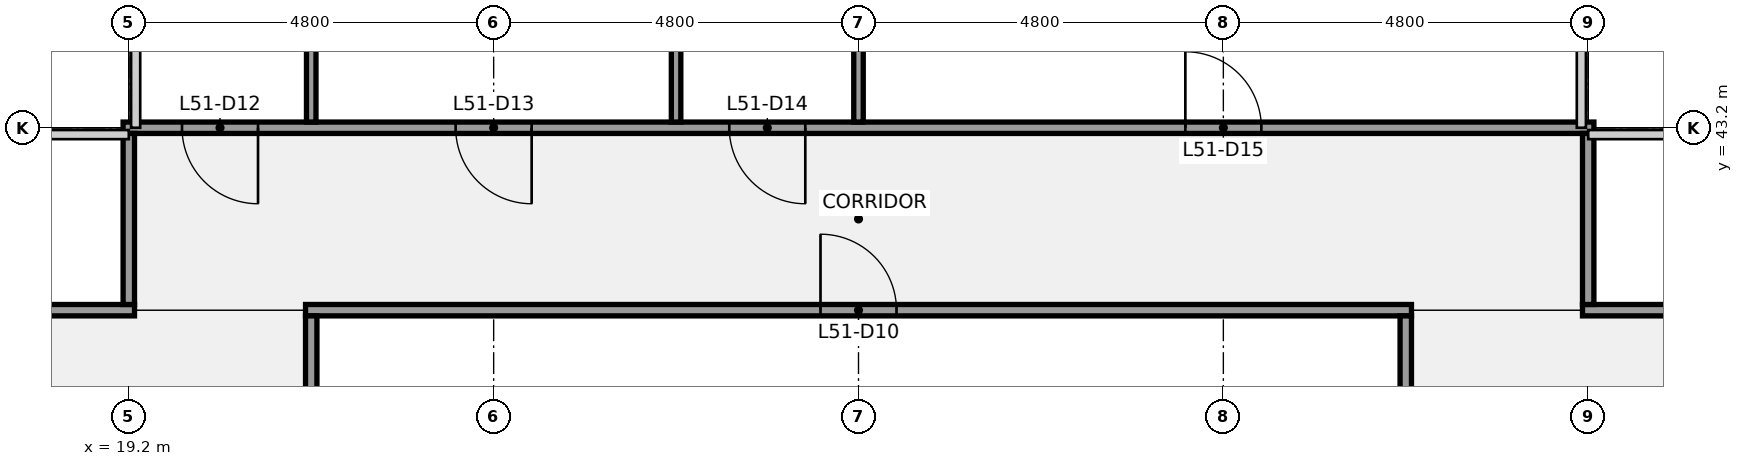
"""IFC4 building model, lengths in metres.
Left out: names, types, materials, properties, quantities, classifications, styles, units other than length and angle.
Written with IfcOpenShell. Run it as: python <this file> out.ifc"""

import sys

from ifc_helpers import new_model, si_unit, direction, frame, frame_2d, origin, place, context, subcontext, project, spatial, rectangle, extrude, element, fill, save


model = new_model("IFC4")
c1 = context("Model", 3, precision=1e-05, world=origin(), true_north=direction((0.0, 1.0)))
c2 = subcontext(c1, "Body", "Model", "MODEL_VIEW")
j1 = project(units=[si_unit("LENGTHUNIT", "METRE"), si_unit("PLANEANGLEUNIT", "RADIAN")], contexts=[c1])
p1 = place(None, origin())
s1 = spatial("IfcSite", under=j1, at=p1, CompositionType="ELEMENT")
p2 = place(p1, origin())
s2 = spatial("IfcBuilding", under=s1, at=p2, CompositionType="ELEMENT")
p3 = place(p2, frame((0.0, 0.0, 233.2)))
s3 = spatial("IfcBuildingStorey", under=s2, at=p3, CompositionType="ELEMENT", Elevation=233.2)
p4 = place(p3, frame((14.325, 40.8, 0.0), z_axis=(0.0, 0.0, 1.0), x_axis=(1.0, 0.0, 0.0)))
e1 = element("IfcWall", 1, at=p4, inside=s3, PredefinedType="PARTITIONING", context=c2, shape_type="SweptSolid", body=[
    extrude(rectangle(XDim=4.95, YDim=0.15, at=frame_2d((2.475, 0.0))), origin(), (0.0, 0.0, 1.0), 2.87),
])
p5 = place(p4, frame((1.975, 0.0, 0.0)))
e2 = element("IfcOpeningElement", 2, at=p5, cuts=e1, PredefinedType="OPENING", context=c2, shape_type="SweptSolid", body=[
    extrude(rectangle(XDim=1.0, YDim=2.1, at=frame_2d((0.5, 1.05))), frame((0.0, 0.085, 0.0), z_axis=(0.0, -1.0, 0.0), x_axis=(1.0, 0.0, 0.0)), (0.0, 0.0, 1.0), 0.17),
])
p6 = place(p3, frame((21.525, 40.8, 0.0), z_axis=(0.0, 0.0, 1.0), x_axis=(1.0, 0.0, 0.0)))
e3 = element("IfcWall", 3, at=p6, inside=s3, PredefinedType="PARTITIONING", context=c2, shape_type="SweptSolid", body=[
    extrude(rectangle(XDim=14.55, YDim=0.15, at=frame_2d((7.275, 0.0))), origin(), (0.0, 0.0, 1.0), 2.87),
])
p7 = place(p6, frame((6.775, 0.0, 0.0)))
e4 = element("IfcOpeningElement", 4, at=p7, cuts=e3, PredefinedType="OPENING", context=c2, shape_type="SweptSolid", body=[
    extrude(rectangle(XDim=1.0, YDim=2.1, at=frame_2d((0.5, 1.05))), frame((0.0, 0.085, 0.0), z_axis=(0.0, -1.0, 0.0), x_axis=(1.0, 0.0, 0.0)), (0.0, 0.0, 1.0), 0.17),
])
p8 = place(p3, frame((38.325, 40.8, 0.0), z_axis=(0.0, 0.0, 1.0), x_axis=(1.0, 0.0, 0.0)))
e5 = element("IfcWall", 5, at=p8, inside=s3, PredefinedType="PARTITIONING", context=c2, shape_type="SweptSolid", body=[
    extrude(rectangle(XDim=4.95, YDim=0.15, at=frame_2d((2.475, 0.0))), origin(), (0.0, 0.0, 1.0), 2.87),
])
p9 = place(p8, frame((1.975, 0.0, 0.0)))
e6 = element("IfcOpeningElement", 6, at=p9, cuts=e5, PredefinedType="OPENING", context=c2, shape_type="SweptSolid", body=[
    extrude(rectangle(XDim=1.0, YDim=2.1, at=frame_2d((0.5, 1.05))), frame((0.0, 0.085, 0.0), z_axis=(0.0, -1.0, 0.0), x_axis=(1.0, 0.0, 0.0)), (0.0, 0.0, 1.0), 0.17),
])
p10 = place(p3, frame((19.125, 43.2, 0.0), z_axis=(0.0, 0.0, 1.0), x_axis=(1.0, 0.0, 0.0)))
e7 = element("IfcWall", 7, at=p10, inside=s3, PredefinedType="PARTITIONING", context=c2, shape_type="SweptSolid", body=[
    extrude(rectangle(XDim=19.35, YDim=0.15, at=frame_2d((9.675, 0.0))), origin(), (0.0, 0.0, 1.0), 2.87),
])
p11 = place(p10, frame((0.775, 0.0, 0.0)))
e8 = element("IfcOpeningElement", 8, at=p11, cuts=e7, PredefinedType="OPENING", context=c2, shape_type="SweptSolid", body=[
    extrude(rectangle(XDim=1.0, YDim=2.1, at=frame_2d((0.5, 1.05))), frame((0.0, 0.085, 0.0), z_axis=(0.0, -1.0, 0.0), x_axis=(1.0, 0.0, 0.0)), (0.0, 0.0, 1.0), 0.17),
])
p12 = place(p10, frame((4.375, 0.0, 0.0)))
e9 = element("IfcOpeningElement", 9, at=p12, cuts=e7, PredefinedType="OPENING", context=c2, shape_type="SweptSolid", body=[
    extrude(rectangle(XDim=1.0, YDim=2.1, at=frame_2d((0.5, 1.05))), frame((0.0, 0.085, 0.0), z_axis=(0.0, -1.0, 0.0), x_axis=(1.0, 0.0, 0.0)), (0.0, 0.0, 1.0), 0.17),
])
p13 = place(p10, frame((7.975, 0.0, 0.0)))
e10 = element("IfcOpeningElement", 10, at=p13, cuts=e7, PredefinedType="OPENING", context=c2, shape_type="SweptSolid", body=[
    extrude(rectangle(XDim=1.0, YDim=2.1, at=frame_2d((0.5, 1.05))), frame((0.0, 0.085, 0.0), z_axis=(0.0, -1.0, 0.0), x_axis=(1.0, 0.0, 0.0)), (0.0, 0.0, 1.0), 0.17),
])
p14 = place(p10, frame((13.975, 0.0, 0.0)))
e11 = element("IfcOpeningElement", 11, at=p14, cuts=e7, PredefinedType="OPENING", context=c2, shape_type="SweptSolid", body=[
    extrude(rectangle(XDim=1.0, YDim=2.1, at=frame_2d((0.5, 1.05))), frame((0.0, 0.085, 0.0), z_axis=(0.0, -1.0, 0.0), x_axis=(1.0, 0.0, 0.0)), (0.0, 0.0, 1.0), 0.17),
])
p15 = place(p3, frame((19.2, 40.875, 0.0), z_axis=(0.0, 0.0, 1.0), x_axis=(0.0, 1.0, 0.0)))
e12 = element("IfcWall", 12, at=p15, inside=s3, PredefinedType="PARTITIONING", context=c2, shape_type="SweptSolid", body=[
    extrude(rectangle(XDim=2.25, YDim=0.15, at=frame_2d((1.125, 0.0))), origin(), (0.0, 0.0, 1.0), 2.87),
])
p16 = place(p3, frame((21.6, 43.275, 0.0), z_axis=(0.0, 0.0, 1.0), x_axis=(0.0, 1.0, 0.0)))
e13 = element("IfcWall", 13, at=p16, inside=s3, PredefinedType="PARTITIONING", context=c2, shape_type="SweptSolid", body=[
    extrude(rectangle(XDim=4.625, YDim=0.125, at=frame_2d((2.312, 0.0))), origin(), (0.0, 0.0, 1.0), 2.87),
])
p17 = place(p3, frame((21.6, 30.062, 0.0), z_axis=(0.0, 0.0, 1.0), x_axis=(0.0, 1.0, 0.0)))
e14 = element("IfcWall", 14, at=p17, inside=s3, PredefinedType="PARTITIONING", context=c2, shape_type="SweptSolid", body=[
    extrude(rectangle(XDim=10.663, YDim=0.15, at=frame_2d((5.331, 0.0))), origin(), (0.0, 0.0, 1.0), 2.87),
])
p18 = place(p3, frame((26.4, 43.275, 0.0), z_axis=(0.0, 0.0, 1.0), x_axis=(0.0, 1.0, 0.0)))
e15 = element("IfcWall", 15, at=p18, inside=s3, PredefinedType="PARTITIONING", context=c2, shape_type="SweptSolid", body=[
    extrude(rectangle(XDim=4.625, YDim=0.125, at=frame_2d((2.312, 0.0))), origin(), (0.0, 0.0, 1.0), 2.87),
])
p19 = place(p3, frame((28.8, 43.275, 0.0), z_axis=(0.0, 0.0, 1.0), x_axis=(0.0, 1.0, 0.0)))
e16 = element("IfcWall", 16, at=p19, inside=s3, PredefinedType="PARTITIONING", context=c2, shape_type="SweptSolid", body=[
    extrude(rectangle(XDim=4.175, YDim=0.125, at=frame_2d((2.087, 0.0))), origin(), (0.0, 0.0, 1.0), 2.87),
])
p20 = place(p3, frame((36.0, 30.062, 0.0), z_axis=(0.0, 0.0, 1.0), x_axis=(0.0, 1.0, 0.0)))
e17 = element("IfcWall", 17, at=p20, inside=s3, PredefinedType="PARTITIONING", context=c2, shape_type="SweptSolid", body=[
    extrude(rectangle(XDim=10.663, YDim=0.15, at=frame_2d((5.331, 0.0))), origin(), (0.0, 0.0, 1.0), 2.87),
])
p21 = place(p3, frame((38.4, 40.875, 0.0), z_axis=(0.0, 0.0, 1.0), x_axis=(0.0, 1.0, 0.0)))
e18 = element("IfcWall", 18, at=p21, inside=s3, PredefinedType="PARTITIONING", context=c2, shape_type="SweptSolid", body=[
    extrude(rectangle(XDim=2.25, YDim=0.15, at=frame_2d((1.125, 0.0))), origin(), (0.0, 0.0, 1.0), 2.87),
])
p22 = place(p7, origin())
e19 = element("IfcDoor", 19, at=p22, inside=s3, OperationType="SINGLE_SWING_LEFT", PredefinedType="DOOR", context=c2, shape_type="SweptSolid", body=[
    extrude(rectangle(XDim=1.0, YDim=2.1, at=frame_2d((0.5, 1.05))), frame((0.0, 0.025, 0.0), z_axis=(0.0, -1.0, 0.0), x_axis=(1.0, 0.0, 0.0)), (0.0, 0.0, 1.0), 0.05),
])
fill(e4, e19)
p23 = place(p11, origin())
e20 = element("IfcDoor", 20, at=p23, inside=s3, OperationType="SINGLE_SWING_RIGHT", PredefinedType="DOOR", context=c2, shape_type="SweptSolid", body=[
    extrude(rectangle(XDim=1.0, YDim=2.1, at=frame_2d((0.5, 1.05))), frame((0.0, 0.025, 0.0), z_axis=(0.0, -1.0, 0.0), x_axis=(1.0, 0.0, 0.0)), (0.0, 0.0, 1.0), 0.05),
])
fill(e8, e20)
p24 = place(p12, origin())
e21 = element("IfcDoor", 21, at=p24, inside=s3, OperationType="SINGLE_SWING_RIGHT", PredefinedType="DOOR", context=c2, shape_type="SweptSolid", body=[
    extrude(rectangle(XDim=1.0, YDim=2.1, at=frame_2d((0.5, 1.05))), frame((0.0, 0.025, 0.0), z_axis=(0.0, -1.0, 0.0), x_axis=(1.0, 0.0, 0.0)), (0.0, 0.0, 1.0), 0.05),
])
fill(e9, e21)
p25 = place(p13, origin())
e22 = element("IfcDoor", 22, at=p25, inside=s3, OperationType="SINGLE_SWING_RIGHT", PredefinedType="DOOR", context=c2, shape_type="SweptSolid", body=[
    extrude(rectangle(XDim=1.0, YDim=2.1, at=frame_2d((0.5, 1.05))), frame((0.0, 0.025, 0.0), z_axis=(0.0, -1.0, 0.0), x_axis=(1.0, 0.0, 0.0)), (0.0, 0.0, 1.0), 0.05),
])
fill(e10, e22)
p26 = place(p14, origin())
e23 = element("IfcDoor", 23, at=p26, inside=s3, OperationType="SINGLE_SWING_LEFT", PredefinedType="DOOR", context=c2, shape_type="SweptSolid", body=[
    extrude(rectangle(XDim=1.0, YDim=2.1, at=frame_2d((0.5, 1.05))), frame((0.0, 0.025, 0.0), z_axis=(0.0, -1.0, 0.0), x_axis=(1.0, 0.0, 0.0)), (0.0, 0.0, 1.0), 0.05),
])
fill(e11, e23)
save(model, sys.argv[1])
